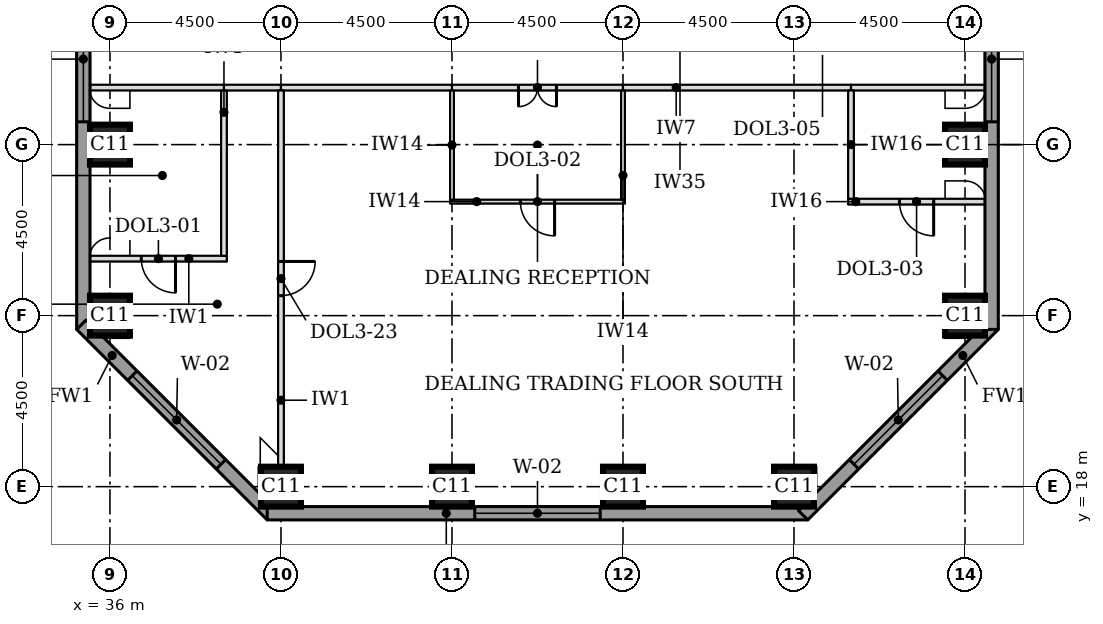
"""IFC4 building model, lengths in metres.
Left out: names, types, materials, properties, quantities, classifications, styles, units other than length and angle.
Written with IfcOpenShell. Run it as: python <this file> out.ifc"""

import sys

from ifc_helpers import new_model, si_unit, direction, frame, frame_2d, origin, origin_2d, place, context, subcontext, project, spatial, rectangle, extrude, element, fill, save


model = new_model("IFC4")
c1 = context("Model", 3, precision=1e-05, world=origin(), true_north=direction((0.0, 1.0)))
c2 = subcontext(c1, "Body", "Model", "MODEL_VIEW")
j1 = project(units=[si_unit("LENGTHUNIT", "METRE"), si_unit("PLANEANGLEUNIT", "RADIAN")], contexts=[c1])
p1 = place(None, origin())
s1 = spatial("IfcSite", under=j1, at=p1, CompositionType="ELEMENT")
p2 = place(p1, origin())
s2 = spatial("IfcBuilding", under=s1, at=p2, CompositionType="ELEMENT")
p3 = place(p2, frame((0.0, 0.0, 97.4)))
s3 = spatial("IfcBuildingStorey", under=s2, at=p3, CompositionType="ELEMENT", Elevation=97.4)
for number, where, z_axis, x_axis in (
    (1, (40.5, 18.0, 0.0), (0.0, 0.0, 1.0), (1.0, 0.0, 0.0)),
    (2, (45.0, 18.0, 0.0), (0.0, 0.0, 1.0), (1.0, 0.0, 0.0)),
    (3, (49.5, 18.0, 0.0), (0.0, 0.0, 1.0), (1.0, 0.0, 0.0)),
    (4, (54.0, 18.0, 0.0), (0.0, 0.0, 1.0), (1.0, 0.0, 0.0)),
    (5, (36.0, 22.5, 0.0), (0.0, 0.0, 1.0), (1.0, 0.0, 0.0)),
    (6, (58.5, 22.5, 0.0), (0.0, 0.0, 1.0), (1.0, 0.0, 0.0)),
    (7, (36.0, 27.0, 0.0), (0.0, 0.0, 1.0), (1.0, 0.0, 0.0)),
    (8, (58.5, 27.0, 0.0), (0.0, 0.0, 1.0), (1.0, 0.0, 0.0)),
):
    element("IfcColumn", number, at=place(p3, frame(where, z_axis=z_axis, x_axis=x_axis)), inside=s3, PredefinedType="COLUMN", context=c2, shape_type="SweptSolid", body=[
        extrude(rectangle(XDim=1.05, YDim=1.05, at=origin_2d()), origin(), (0.0, 0.0, 1.0), 3.7),
    ])
p4 = place(p3, frame((35.3, 39.975, 0.0), z_axis=(0.0, 0.0, 1.0), x_axis=(0.0, -1.0, 0.0)))
e9 = element("IfcWall", 9, at=p4, inside=s3, PredefinedType="STANDARD", context=c2, shape_type="SweptSolid", body=[
    extrude(rectangle(XDim=17.837, YDim=0.35, at=frame_2d((8.919, 0.0))), origin(), (0.0, 0.0, 1.0), 3.525),
])
p5 = place(p4, frame((0.5, 0.0, 0.9)))
e10 = element("IfcOpeningElement", 10, at=p5, cuts=e9, PredefinedType="OPENING", context=c2, shape_type="SweptSolid", body=[
    extrude(rectangle(XDim=3.3, YDim=1.9, at=frame_2d((1.65, 0.95))), frame((0.0, 0.185, 0.0), z_axis=(0.0, -1.0, 0.0), x_axis=(1.0, 0.0, 0.0)), (0.0, 0.0, 1.0), 0.37),
])
p6 = place(p4, frame((9.075, 0.0, 0.9)))
e11 = element("IfcOpeningElement", 11, at=p6, cuts=e9, PredefinedType="OPENING", context=c2, shape_type="SweptSolid", body=[
    extrude(rectangle(XDim=3.3, YDim=1.9, at=frame_2d((1.65, 0.95))), frame((0.0, 0.185, 0.0), z_axis=(0.0, -1.0, 0.0), x_axis=(1.0, 0.0, 0.0)), (0.0, 0.0, 1.0), 0.37),
])
p7 = place(p3, frame((35.249, 22.261, 0.0), z_axis=(0.0, 0.0, 1.0), x_axis=(0.707106781187, -0.707106781187, 0.0)))
e12 = element("IfcWall", 12, at=p7, inside=s3, PredefinedType="STANDARD", context=c2, shape_type="SweptSolid", body=[
    extrude(rectangle(XDim=7.089, YDim=0.35, at=frame_2d((3.544, 0.0))), origin(), (0.0, 0.0, 1.0), 3.525),
])
p8 = place(p7, frame((1.894, 0.0, 0.9)))
e13 = element("IfcOpeningElement", 13, at=p8, cuts=e12, PredefinedType="OPENING", context=c2, shape_type="SweptSolid", body=[
    extrude(rectangle(XDim=3.3, YDim=1.9, at=frame_2d((1.65, 0.95))), frame((0.0, 0.185, 0.0), z_axis=(0.0, -1.0, 0.0), x_axis=(1.0, 0.0, 0.0)), (0.0, 0.0, 1.0), 0.37),
])
p9 = place(p3, frame((40.138, 17.3, 0.0), z_axis=(0.0, 0.0, 1.0), x_axis=(1.0, 0.0, 0.0)))
e14 = element("IfcWall", 14, at=p9, inside=s3, PredefinedType="STANDARD", context=c2, shape_type="SweptSolid", body=[
    extrude(rectangle(XDim=14.225, YDim=0.35, at=frame_2d((7.112, 0.0))), origin(), (0.0, 0.0, 1.0), 3.525),
])
p10 = place(p9, frame((5.462, 0.0, 0.9)))
e15 = element("IfcOpeningElement", 15, at=p10, cuts=e14, PredefinedType="OPENING", context=c2, shape_type="SweptSolid", body=[
    extrude(rectangle(XDim=3.3, YDim=1.9, at=frame_2d((1.65, 0.95))), frame((0.0, 0.185, 0.0), z_axis=(0.0, -1.0, 0.0), x_axis=(1.0, 0.0, 0.0)), (0.0, 0.0, 1.0), 0.37),
])
p11 = place(p3, frame((54.239, 17.249, 0.0), z_axis=(0.0, 0.0, 1.0), x_axis=(0.707106781187, 0.707106781187, 0.0)))
e16 = element("IfcWall", 16, at=p11, inside=s3, PredefinedType="STANDARD", context=c2, shape_type="SweptSolid", body=[
    extrude(rectangle(XDim=7.089, YDim=0.35, at=frame_2d((3.544, 0.0))), origin(), (0.0, 0.0, 1.0), 3.525),
])
p12 = place(p11, frame((1.894, 0.0, 0.9)))
e17 = element("IfcOpeningElement", 17, at=p12, cuts=e16, PredefinedType="OPENING", context=c2, shape_type="SweptSolid", body=[
    extrude(rectangle(XDim=3.3, YDim=1.9, at=frame_2d((1.65, 0.95))), frame((0.0, 0.185, 0.0), z_axis=(0.0, -1.0, 0.0), x_axis=(1.0, 0.0, 0.0)), (0.0, 0.0, 1.0), 0.37),
])
p13 = place(p3, frame((59.2, 22.138, 0.0), z_axis=(0.0, 0.0, 1.0), x_axis=(0.0, 1.0, 0.0)))
e18 = element("IfcWall", 18, at=p13, inside=s3, PredefinedType="STANDARD", context=c2, shape_type="SweptSolid", body=[
    extrude(rectangle(XDim=17.837, YDim=0.35, at=frame_2d((8.919, 0.0))), origin(), (0.0, 0.0, 1.0), 3.525),
])
p14 = place(p13, frame((5.462, 0.0, 0.9)))
e19 = element("IfcOpeningElement", 19, at=p14, cuts=e18, PredefinedType="OPENING", context=c2, shape_type="SweptSolid", body=[
    extrude(rectangle(XDim=3.3, YDim=1.9, at=frame_2d((1.65, 0.95))), frame((0.0, 0.185, 0.0), z_axis=(0.0, -1.0, 0.0), x_axis=(1.0, 0.0, 0.0)), (0.0, 0.0, 1.0), 0.37),
])
p15 = place(p13, frame((14.037, 0.0, 0.9)))
e20 = element("IfcOpeningElement", 20, at=p15, cuts=e18, PredefinedType="OPENING", context=c2, shape_type="SweptSolid", body=[
    extrude(rectangle(XDim=3.3, YDim=1.9, at=frame_2d((1.65, 0.95))), frame((0.0, 0.185, 0.0), z_axis=(0.0, -1.0, 0.0), x_axis=(1.0, 0.0, 0.0)), (0.0, 0.0, 1.0), 0.37),
])
p16 = place(p3, frame((35.475, 24.0, 0.0), z_axis=(0.0, 0.0, 1.0), x_axis=(1.0, 0.0, 0.0)))
e21 = element("IfcWall", 21, at=p16, inside=s3, PredefinedType="PARTITIONING", context=c2, shape_type="SweptSolid", body=[
    extrude(rectangle(XDim=3.6, YDim=0.15, at=frame_2d((1.8, 0.0))), origin(), (0.0, 0.0, 1.0), 3.55),
])
p17 = place(p16, frame((1.35, 0.0, 0.0)))
e22 = element("IfcOpeningElement", 22, at=p17, cuts=e21, PredefinedType="OPENING", context=c2, shape_type="SweptSolid", body=[
    extrude(rectangle(XDim=0.9, YDim=2.1, at=frame_2d((0.45, 1.05))), frame((0.0, 0.085, 0.0), z_axis=(0.0, -1.0, 0.0), x_axis=(1.0, 0.0, 0.0)), (0.0, 0.0, 1.0), 0.17),
])
p18 = place(p3, frame((44.95, 25.5, 0.0), z_axis=(0.0, 0.0, 1.0), x_axis=(1.0, 0.0, 0.0)))
e23 = element("IfcWall", 23, at=p18, inside=s3, PredefinedType="PARTITIONING", context=c2, shape_type="SweptSolid", body=[
    extrude(rectangle(XDim=4.6, YDim=0.1, at=frame_2d((2.3, 0.0))), origin(), (0.0, 0.0, 1.0), 3.55),
])
p19 = place(p18, frame((1.85, 0.0, 0.0)))
e24 = element("IfcOpeningElement", 24, at=p19, cuts=e23, PredefinedType="OPENING", context=c2, shape_type="SweptSolid", body=[
    extrude(rectangle(XDim=0.9, YDim=2.1, at=frame_2d((0.45, 1.05))), frame((0.0, 0.06, 0.0), z_axis=(0.0, -1.0, 0.0), x_axis=(1.0, 0.0, 0.0)), (0.0, 0.0, 1.0), 0.12),
])
p20 = place(p3, frame((55.425, 25.5, 0.0), z_axis=(0.0, 0.0, 1.0), x_axis=(1.0, 0.0, 0.0)))
e25 = element("IfcWall", 25, at=p20, inside=s3, PredefinedType="PARTITIONING", context=c2, shape_type="SweptSolid", body=[
    extrude(rectangle(XDim=3.6, YDim=0.15, at=frame_2d((1.8, 0.0))), origin(), (0.0, 0.0, 1.0), 3.55),
])
p21 = place(p20, frame((1.35, 0.0, 0.0)))
e26 = element("IfcOpeningElement", 26, at=p21, cuts=e25, PredefinedType="OPENING", context=c2, shape_type="SweptSolid", body=[
    extrude(rectangle(XDim=0.9, YDim=2.1, at=frame_2d((0.45, 1.05))), frame((0.0, 0.085, 0.0), z_axis=(0.0, -1.0, 0.0), x_axis=(1.0, 0.0, 0.0)), (0.0, 0.0, 1.0), 0.17),
])
p22 = place(p3, frame((35.475, 28.5, 0.0), z_axis=(0.0, 0.0, 1.0), x_axis=(1.0, 0.0, 0.0)))
e27 = element("IfcWall", 27, at=p22, inside=s3, PredefinedType="PARTITIONING", context=c2, shape_type="SweptSolid", body=[
    extrude(rectangle(XDim=3.525, YDim=0.15, at=frame_2d((1.762, 0.0))), origin(), (0.0, 0.0, 1.0), 3.55),
])
p23 = place(p3, frame((39.0, 28.5, 0.0), z_axis=(0.0, 0.0, 1.0), x_axis=(1.0, 0.0, 0.0)))
e28 = element("IfcWall", 28, at=p23, inside=s3, PredefinedType="PARTITIONING", context=c2, shape_type="SweptSolid", body=[
    extrude(rectangle(XDim=1.5, YDim=0.15, at=frame_2d((0.75, 0.0))), origin(), (0.0, 0.0, 1.0), 3.55),
])
p24 = place(p3, frame((40.5, 28.5, 0.0), z_axis=(0.0, 0.0, 1.0), x_axis=(1.0, 0.0, 0.0)))
e29 = element("IfcWall", 29, at=p24, inside=s3, PredefinedType="PARTITIONING", context=c2, shape_type="SweptSolid", body=[
    extrude(rectangle(XDim=4.5, YDim=0.15, at=frame_2d((2.25, 0.0))), origin(), (0.0, 0.0, 1.0), 3.55),
])
p25 = place(p3, frame((45.0, 28.5, 0.0), z_axis=(0.0, 0.0, 1.0), x_axis=(1.0, 0.0, 0.0)))
e30 = element("IfcWall", 30, at=p25, inside=s3, PredefinedType="PARTITIONING", context=c2, shape_type="SweptSolid", body=[
    extrude(rectangle(XDim=4.5, YDim=0.15, at=frame_2d((2.25, 0.0))), origin(), (0.0, 0.0, 1.0), 3.55),
])
p26 = place(p25, frame((1.75, 0.0, 0.0)))
e31 = element("IfcOpeningElement", 31, at=p26, cuts=e30, PredefinedType="OPENING", context=c2, shape_type="SweptSolid", body=[
    extrude(rectangle(XDim=1.0, YDim=2.1, at=frame_2d((0.5, 1.05))), frame((0.0, 0.085, 0.0), z_axis=(0.0, -1.0, 0.0), x_axis=(1.0, 0.0, 0.0)), (0.0, 0.0, 1.0), 0.17),
])
p27 = place(p3, frame((49.5, 28.5, 0.0), z_axis=(0.0, 0.0, 1.0), x_axis=(1.0, 0.0, 0.0)))
e32 = element("IfcWall", 32, at=p27, inside=s3, PredefinedType="PARTITIONING", context=c2, shape_type="SweptSolid", body=[
    extrude(rectangle(XDim=6.0, YDim=0.15, at=frame_2d((3.0, 0.0))), origin(), (0.0, 0.0, 1.0), 3.55),
])
p28 = place(p3, frame((55.5, 28.5, 0.0), z_axis=(0.0, 0.0, 1.0), x_axis=(1.0, 0.0, 0.0)))
e33 = element("IfcWall", 33, at=p28, inside=s3, PredefinedType="PARTITIONING", context=c2, shape_type="SweptSolid", body=[
    extrude(rectangle(XDim=3.525, YDim=0.15, at=frame_2d((1.762, 0.0))), origin(), (0.0, 0.0, 1.0), 3.55),
])
p29 = place(p3, frame((40.5, 18.525, 0.0), z_axis=(0.0, 0.0, 1.0), x_axis=(0.0, 1.0, 0.0)))
e34 = element("IfcWall", 34, at=p29, inside=s3, PredefinedType="PARTITIONING", context=c2, shape_type="SweptSolid", body=[
    extrude(rectangle(XDim=9.9, YDim=0.15, at=frame_2d((4.95, 0.0))), origin(), (0.0, 0.0, 1.0), 3.55),
])
p30 = place(p29, frame((4.5, 0.0, 0.0)))
e35 = element("IfcOpeningElement", 35, at=p30, cuts=e34, PredefinedType="OPENING", context=c2, shape_type="SweptSolid", body=[
    extrude(rectangle(XDim=0.9, YDim=2.1, at=frame_2d((0.45, 1.05))), frame((0.0, 0.085, 0.0), z_axis=(0.0, -1.0, 0.0), x_axis=(1.0, 0.0, 0.0)), (0.0, 0.0, 1.0), 0.17),
])
p31 = place(p3, frame((39.0, 24.075, 0.0), z_axis=(0.0, 0.0, 1.0), x_axis=(0.0, 1.0, 0.0)))
e36 = element("IfcWall", 36, at=p31, inside=s3, PredefinedType="PARTITIONING", context=c2, shape_type="SweptSolid", body=[
    extrude(rectangle(XDim=4.35, YDim=0.15, at=frame_2d((2.175, 0.0))), origin(), (0.0, 0.0, 1.0), 3.55),
])
for number, where, z_axis, x_axis in (
    (37, (45.0, 25.55, 0.0), (0.0, 0.0, 1.0), (0.0, 1.0, 0.0)),
    (38, (49.5, 25.55, 0.0), (0.0, 0.0, 1.0), (0.0, 1.0, 0.0)),
):
    element("IfcWall", number, at=place(p3, frame(where, z_axis=z_axis, x_axis=x_axis)), inside=s3, PredefinedType="PARTITIONING", context=c2, shape_type="SweptSolid", body=[
        extrude(rectangle(XDim=2.875, YDim=0.1, at=frame_2d((1.438, 0.0))), origin(), (0.0, 0.0, 1.0), 3.55),
    ])
p32 = place(p3, frame((55.5, 25.575, 0.0), z_axis=(0.0, 0.0, 1.0), x_axis=(0.0, 1.0, 0.0)))
e39 = element("IfcWall", 39, at=p32, inside=s3, PredefinedType="PARTITIONING", context=c2, shape_type="SweptSolid", body=[
    extrude(rectangle(XDim=2.85, YDim=0.15, at=frame_2d((1.425, 0.0))), origin(), (0.0, 0.0, 1.0), 3.55),
])
p33 = place(p6, origin())
e40 = element("IfcWindow", 40, at=p33, inside=s3, PartitioningType="SINGLE_PANEL", PredefinedType="WINDOW", context=c2, shape_type="SweptSolid", body=[
    extrude(rectangle(XDim=3.3, YDim=1.9, at=frame_2d((1.65, 0.95))), frame((0.0, 0.085, 0.0), z_axis=(0.0, -1.0, 0.0), x_axis=(1.0, 0.0, 0.0)), (0.0, 0.0, 1.0), 0.06),
])
fill(e11, e40)
p34 = place(p8, origin())
e41 = element("IfcWindow", 41, at=p34, inside=s3, PartitioningType="SINGLE_PANEL", PredefinedType="WINDOW", context=c2, shape_type="SweptSolid", body=[
    extrude(rectangle(XDim=3.3, YDim=1.9, at=frame_2d((1.65, 0.95))), frame((0.0, 0.085, 0.0), z_axis=(0.0, -1.0, 0.0), x_axis=(1.0, 0.0, 0.0)), (0.0, 0.0, 1.0), 0.06),
])
fill(e13, e41)
p35 = place(p10, origin())
e42 = element("IfcWindow", 42, at=p35, inside=s3, PartitioningType="SINGLE_PANEL", PredefinedType="WINDOW", context=c2, shape_type="SweptSolid", body=[
    extrude(rectangle(XDim=3.3, YDim=1.9, at=frame_2d((1.65, 0.95))), frame((0.0, 0.085, 0.0), z_axis=(0.0, -1.0, 0.0), x_axis=(1.0, 0.0, 0.0)), (0.0, 0.0, 1.0), 0.06),
])
fill(e15, e42)
p36 = place(p12, origin())
e43 = element("IfcWindow", 43, at=p36, inside=s3, PartitioningType="SINGLE_PANEL", PredefinedType="WINDOW", context=c2, shape_type="SweptSolid", body=[
    extrude(rectangle(XDim=3.3, YDim=1.9, at=frame_2d((1.65, 0.95))), frame((0.0, 0.085, 0.0), z_axis=(0.0, -1.0, 0.0), x_axis=(1.0, 0.0, 0.0)), (0.0, 0.0, 1.0), 0.06),
])
fill(e17, e43)
p37 = place(p14, origin())
e44 = element("IfcWindow", 44, at=p37, inside=s3, PartitioningType="SINGLE_PANEL", PredefinedType="WINDOW", context=c2, shape_type="SweptSolid", body=[
    extrude(rectangle(XDim=3.3, YDim=1.9, at=frame_2d((1.65, 0.95))), frame((0.0, 0.085, 0.0), z_axis=(0.0, -1.0, 0.0), x_axis=(1.0, 0.0, 0.0)), (0.0, 0.0, 1.0), 0.06),
])
fill(e19, e44)
p38 = place(p26, frame((1.0, 0.0, 0.0), z_axis=(0.0, 0.0, 1.0), x_axis=(-1.0, 0.0, 0.0)))
e45 = element("IfcDoor", 45, at=p38, inside=s3, OperationType="DOUBLE_DOOR_SINGLE_SWING", PredefinedType="DOOR", context=c2, shape_type="SweptSolid", body=[
    extrude(rectangle(XDim=1.0, YDim=2.1, at=frame_2d((0.5, 1.05))), frame((0.0, 0.025, 0.0), z_axis=(0.0, -1.0, 0.0), x_axis=(1.0, 0.0, 0.0)), (0.0, 0.0, 1.0), 0.05),
])
fill(e31, e45)
p39 = place(p19, frame((0.9, 0.0, 0.0), z_axis=(0.0, 0.0, 1.0), x_axis=(-1.0, 0.0, 0.0)))
e46 = element("IfcDoor", 46, at=p39, inside=s3, OperationType="SINGLE_SWING_LEFT", PredefinedType="DOOR", context=c2, shape_type="SweptSolid", body=[
    extrude(rectangle(XDim=0.9, YDim=2.1, at=frame_2d((0.45, 1.05))), frame((0.0, 0.025, 0.0), z_axis=(0.0, -1.0, 0.0), x_axis=(1.0, 0.0, 0.0)), (0.0, 0.0, 1.0), 0.05),
])
fill(e24, e46)
p40 = place(p21, frame((0.9, 0.0, 0.0), z_axis=(0.0, 0.0, 1.0), x_axis=(-1.0, 0.0, 0.0)))
e47 = element("IfcDoor", 47, at=p40, inside=s3, OperationType="SINGLE_SWING_LEFT", PredefinedType="DOOR", context=c2, shape_type="SweptSolid", body=[
    extrude(rectangle(XDim=0.9, YDim=2.1, at=frame_2d((0.45, 1.05))), frame((0.0, 0.025, 0.0), z_axis=(0.0, -1.0, 0.0), x_axis=(1.0, 0.0, 0.0)), (0.0, 0.0, 1.0), 0.05),
])
fill(e26, e47)
p41 = place(p30, frame((0.9, 0.0, 0.0), z_axis=(0.0, 0.0, 1.0), x_axis=(-1.0, 0.0, 0.0)))
e48 = element("IfcDoor", 48, at=p41, inside=s3, OperationType="SINGLE_SWING_LEFT", PredefinedType="DOOR", context=c2, shape_type="SweptSolid", body=[
    extrude(rectangle(XDim=0.9, YDim=2.1, at=frame_2d((0.45, 1.05))), frame((0.0, 0.025, 0.0), z_axis=(0.0, -1.0, 0.0), x_axis=(1.0, 0.0, 0.0)), (0.0, 0.0, 1.0), 0.05),
])
fill(e35, e48)
p42 = place(p17, frame((0.9, 0.0, 0.0), z_axis=(0.0, 0.0, 1.0), x_axis=(-1.0, 0.0, 0.0)))
e49 = element("IfcDoor", 49, at=p42, inside=s3, OperationType="SINGLE_SWING_LEFT", PredefinedType="DOOR", context=c2, shape_type="SweptSolid", body=[
    extrude(rectangle(XDim=0.9, YDim=2.1, at=frame_2d((0.45, 1.05))), frame((0.0, 0.025, 0.0), z_axis=(0.0, -1.0, 0.0), x_axis=(1.0, 0.0, 0.0)), (0.0, 0.0, 1.0), 0.05),
])
fill(e22, e49)
save(model, sys.argv[1])
